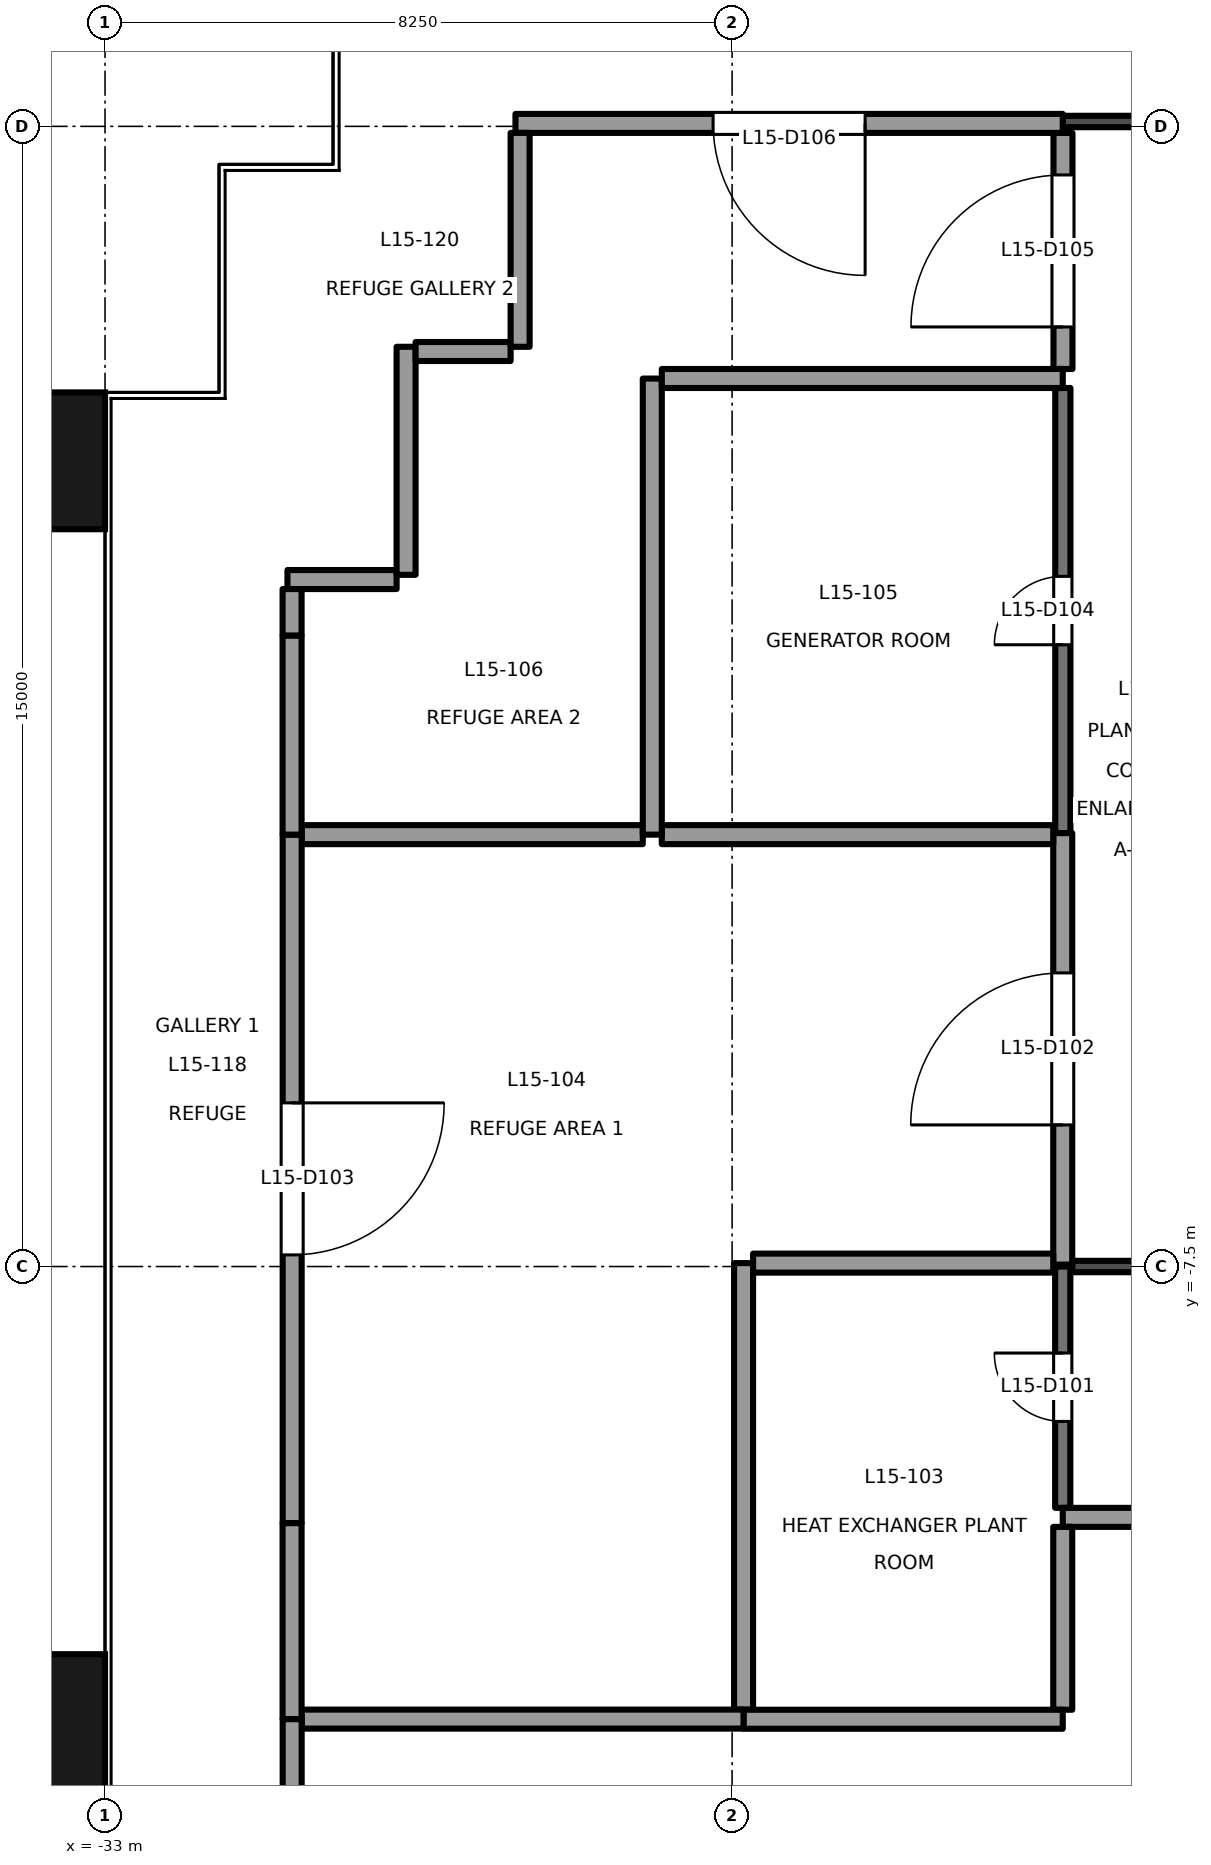
"""IFC4 building model, lengths in metres.
Left out: names, types, materials, properties, quantities, classifications, styles, units other than length and angle.
Written with IfcOpenShell. Run it as: python <this file> out.ifc"""

import sys

from ifc_helpers import new_model, si_unit, direction, frame, frame_2d, origin, origin_2d, place, context, subcontext, project, spatial, rectangle, extrude, element, fill, save


model = new_model("IFC4")
c1 = context("Model", 3, precision=1e-05, world=origin(), true_north=direction((0.0, 1.0)))
c2 = subcontext(c1, "Body", "Model", "MODEL_VIEW")
j1 = project(units=[si_unit("LENGTHUNIT", "METRE"), si_unit("PLANEANGLEUNIT", "RADIAN")], contexts=[c1])
p1 = place(None, origin())
s1 = spatial("IfcSite", under=j1, at=p1, CompositionType="ELEMENT")
p2 = place(p1, origin())
s2 = spatial("IfcBuilding", under=s1, at=p2, CompositionType="ELEMENT")
p3 = place(p2, frame((0.0, 0.0, 69.3)))
s3 = spatial("IfcBuildingStorey", under=s2, at=p3, CompositionType="ELEMENT", Elevation=69.3)
for number, where, z_axis, x_axis in (
    (1, (-33.9, -13.5, -0.2), (0.0, 0.0, 1.0), (0.0, 1.0, 0.0)),
    (2, (-33.9, 3.1, -0.2), (0.0, 0.0, 1.0), (0.0, 1.0, 0.0)),
):
    element("IfcColumn", number, at=place(p3, frame(where, z_axis=z_axis, x_axis=x_axis)), inside=s3, PredefinedType="COLUMN", context=c2, shape_type="SweptSolid", body=[
        extrude(rectangle(XDim=1.8, YDim=1.8, at=origin_2d()), origin(), (0.0, 0.0, 1.0), 5.0),
    ])
p4 = place(p3, frame((-20.275, -7.5, 0.0), z_axis=(0.0, 0.0, 1.0), x_axis=(1.0, 0.0, 0.0)))
e3 = element("IfcWall", 3, at=p4, inside=s3, PredefinedType="PARTITIONING", context=c2, shape_type="SweptSolid", body=[
    extrude(rectangle(XDim=2.295, YDim=0.15, at=frame_2d((1.147, 0.0))), origin(), (0.0, 0.0, 1.0), 2.15),
])
p5 = place(p3, frame((-20.4, -10.675, 0.0), z_axis=(0.0, 0.0, 1.0), x_axis=(0.0, 1.0, 0.0)))
e4 = element("IfcWall", 4, at=p5, inside=s3, PredefinedType="PARTITIONING", context=c2, shape_type="SweptSolid", body=[
    extrude(rectangle(XDim=3.175, YDim=0.2, at=frame_2d((1.587, 0.0))), origin(), (0.0, 0.0, 1.0), 4.4),
])
p6 = place(p5, frame((1.137, 0.0, 0.0)))
e5 = element("IfcOpeningElement", 5, at=p6, cuts=e4, PredefinedType="OPENING", context=c2, shape_type="SweptSolid", body=[
    extrude(rectangle(XDim=0.9, YDim=2.1, at=frame_2d((0.45, 1.05))), frame((0.0, 0.111, 0.0), z_axis=(0.0, -1.0, 0.0), x_axis=(1.0, 0.0, 0.0)), (0.0, 0.0, 1.0), 0.221),
])
p7 = place(p3, frame((-6.125, -10.8, 0.0), z_axis=(0.0, 0.0, 1.0), x_axis=(-1.0, 0.0, 0.0)))
e6 = element("IfcWall", 6, at=p7, inside=s3, PredefinedType="PARTITIONING", context=c2, shape_type="SweptSolid", body=[
    extrude(rectangle(XDim=14.275, YDim=0.25, at=frame_2d((7.137, 0.0))), origin(), (0.0, 0.0, 1.0), 2.15),
])
p8 = place(p7, frame((6.138, 0.0, 0.0)))
e7 = element("IfcOpeningElement", 7, at=p8, cuts=e6, PredefinedType="OPENING", context=c2, shape_type="SweptSolid", body=[
    extrude(rectangle(XDim=2.0, YDim=2.1, at=frame_2d((1.0, 1.05))), frame((0.0, 0.135, 0.0), z_axis=(0.0, -1.0, 0.0), x_axis=(1.0, 0.0, 0.0)), (0.0, 0.0, 1.0), 0.271),
])
p9 = place(p3, frame((-20.4, -7.475, 0.0), z_axis=(0.0, 0.0, 1.0), x_axis=(0.0, 1.0, 0.0)))
e8 = element("IfcWall", 8, at=p9, inside=s3, PredefinedType="PARTITIONING", context=c2, shape_type="SweptSolid", body=[
    extrude(rectangle(XDim=5.677, YDim=0.25, at=frame_2d((2.838, 0.0))), origin(), (0.0, 0.0, 1.0), 4.4),
])
p10 = place(p9, frame((1.838, 0.0, 0.0)))
e9 = element("IfcOpeningElement", 9, at=p10, cuts=e8, PredefinedType="OPENING", context=c2, shape_type="SweptSolid", body=[
    extrude(rectangle(XDim=2.0, YDim=2.1, at=frame_2d((1.0, 1.05))), frame((0.0, 0.135, 0.0), z_axis=(0.0, -1.0, 0.0), x_axis=(1.0, 0.0, 0.0)), (0.0, 0.0, 1.0), 0.271),
])
p11 = place(p3, frame((-20.399, -1.798, 0.0), z_axis=(0.0, 0.0, 1.0), x_axis=(0.0, 1.0, 0.0)))
e10 = element("IfcWall", 10, at=p11, inside=s3, PredefinedType="PARTITIONING", context=c2, shape_type="SweptSolid", body=[
    extrude(rectangle(XDim=5.856, YDim=0.2, at=frame_2d((2.928, 0.0))), origin(), (0.0, 0.0, 1.0), 2.75),
])
p12 = place(p11, frame((2.478, 0.0, 0.0)))
e11 = element("IfcOpeningElement", 11, at=p12, cuts=e10, PredefinedType="OPENING", context=c2, shape_type="SweptSolid", body=[
    extrude(rectangle(XDim=0.9, YDim=2.1, at=frame_2d((0.45, 1.05))), frame((0.0, 0.111, 0.0), z_axis=(0.0, -1.0, 0.0), x_axis=(1.0, 0.0, 0.0)), (0.0, 0.0, 1.0), 0.221),
])
p13 = place(p3, frame((-20.397, 4.308, 0.0), z_axis=(0.0, 0.0, 1.0), x_axis=(0.0, 1.0, 0.0)))
e12 = element("IfcWall", 12, at=p13, inside=s3, PredefinedType="PARTITIONING", context=c2, shape_type="SweptSolid", body=[
    extrude(rectangle(XDim=3.106, YDim=0.25, at=frame_2d((1.553, 0.0))), origin(), (0.0, 0.0, 1.0), 4.4),
])
p14 = place(p13, frame((0.553, 0.0, 0.0)))
e13 = element("IfcOpeningElement", 13, at=p14, cuts=e12, PredefinedType="OPENING", context=c2, shape_type="SweptSolid", body=[
    extrude(rectangle(XDim=2.0, YDim=2.1, at=frame_2d((1.0, 1.05))), frame((0.0, 0.135, 0.0), z_axis=(0.0, -1.0, 0.0), x_axis=(1.0, 0.0, 0.0)), (0.0, 0.0, 1.0), 0.271),
])
p15 = place(p3, frame((-20.4, 7.564, 0.0), z_axis=(0.0, 0.0, 1.0), x_axis=(1.0, 0.0, 0.0)))
e14 = element("IfcWall", 14, at=p15, inside=s3, PredefinedType="PARTITIONING", context=c2, shape_type="SweptSolid", body=[
    extrude(rectangle(XDim=2.58, YDim=0.15, at=frame_2d((1.29, 0.0))), origin(), (0.0, 0.0, 1.0), 2.75),
])
p16 = place(p3, frame((-24.599, -13.329, 0.0), z_axis=(0.0, 0.0, 1.0), x_axis=(0.0, 1.0, 0.0)))
e15 = element("IfcWall", 15, at=p16, inside=s3, PredefinedType="PARTITIONING", context=c2, shape_type="SweptSolid", body=[
    extrude(rectangle(XDim=5.874, YDim=0.25, at=frame_2d((2.937, 0.0))), origin(), (0.0, 0.0, 1.0), 2.75),
])
p17 = place(p3, frame((-24.474, -7.455, 0.0), z_axis=(0.0, 0.0, 1.0), x_axis=(1.0, 0.0, 0.0)))
e16 = element("IfcWall", 16, at=p17, inside=s3, PredefinedType="PARTITIONING", context=c2, shape_type="SweptSolid", body=[
    extrude(rectangle(XDim=3.949, YDim=0.25, at=frame_2d((1.975, 0.0))), origin(), (0.0, 0.0, 1.0), 4.8),
])
p18 = place(p3, frame((-20.4, -10.925, 0.0), z_axis=(0.0, 0.0, 1.0), x_axis=(0.0, -1.0, 0.0)))
e17 = element("IfcWall", 17, at=p18, inside=s3, PredefinedType="PARTITIONING", context=c2, shape_type="SweptSolid", body=[
    extrude(rectangle(XDim=2.406, YDim=0.25, at=frame_2d((1.203, 0.0))), origin(), (0.0, 0.0, 1.0), 2.75),
])
p19 = place(p3, frame((-20.4, -13.456, 0.0), z_axis=(0.0, 0.0, 1.0), x_axis=(-1.0, 0.0, 0.0)))
e18 = element("IfcWall", 18, at=p19, inside=s3, PredefinedType="PARTITIONING", context=c2, shape_type="SweptSolid", body=[
    extrude(rectangle(XDim=4.2, YDim=0.25, at=frame_2d((2.1, 0.0))), origin(), (0.0, 0.0, 1.0), 2.75),
])
p20 = place(p3, frame((-25.675, -1.818, 0.0), z_axis=(0.0, 0.0, 1.0), x_axis=(1.0, 0.0, 0.0)))
e19 = element("IfcWall", 19, at=p20, inside=s3, PredefinedType="PARTITIONING", context=c2, shape_type="SweptSolid", body=[
    extrude(rectangle(XDim=5.15, YDim=0.25, at=frame_2d((2.575, 0.0))), origin(), (0.0, 0.0, 1.0), 4.8),
])
p21 = place(p3, frame((-30.413, -1.818, 0.0), z_axis=(0.0, 0.0, 1.0), x_axis=(1.0, 0.0, 0.0)))
e20 = element("IfcWall", 20, at=p21, inside=s3, PredefinedType="PARTITIONING", context=c2, shape_type="SweptSolid", body=[
    extrude(rectangle(XDim=4.488, YDim=0.25, at=frame_2d((2.244, 0.0))), origin(), (0.0, 0.0, 1.0), 3.7),
])
p22 = place(p3, frame((-24.6, -13.454, 0.0), z_axis=(0.0, 0.0, 1.0), x_axis=(-1.0, 0.0, 0.0)))
e21 = element("IfcWall", 21, at=p22, inside=s3, PredefinedType="PARTITIONING", context=c2, shape_type="SweptSolid", body=[
    extrude(rectangle(XDim=5.813, YDim=0.25, at=frame_2d((2.906, 0.0))), origin(), (0.0, 0.0, 1.0), 2.75),
])
p23 = place(p3, frame((-30.539, -13.455, 0.0), z_axis=(0.0, 0.0, 1.0), x_axis=(0.0, 1.0, 0.0)))
e22 = element("IfcWall", 22, at=p23, inside=s3, PredefinedType="PARTITIONING", context=c2, shape_type="SweptSolid", body=[
    extrude(rectangle(XDim=2.58, YDim=0.25, at=frame_2d((1.29, 0.0))), origin(), (0.0, 0.0, 1.0), 2.75),
])
p24 = place(p3, frame((-30.538, -1.818, 0.0), z_axis=(0.0, 0.0, 1.0), x_axis=(0.0, -1.0, 0.0)))
e23 = element("IfcWall", 23, at=p24, inside=s3, PredefinedType="PARTITIONING", context=c2, shape_type="SweptSolid", body=[
    extrude(rectangle(XDim=9.057, YDim=0.25, at=frame_2d((4.528, 0.0))), origin(), (0.0, 0.0, 1.0), 4.8),
])
p25 = place(p24, frame((3.529, 0.0, 0.0)))
e24 = element("IfcOpeningElement", 24, at=p25, cuts=e23, PredefinedType="OPENING", context=c2, shape_type="SweptSolid", body=[
    extrude(rectangle(XDim=2.0, YDim=2.1, at=frame_2d((1.0, 1.05))), frame((0.0, 0.135, 0.0), z_axis=(0.0, -1.0, 0.0), x_axis=(1.0, 0.0, 0.0)), (0.0, 0.0, 1.0), 0.271),
])
p26 = place(p3, frame((-25.8, -1.818, 0.0), z_axis=(0.0, 0.0, 1.0), x_axis=(0.0, 1.0, 0.0)))
e25 = element("IfcWall", 25, at=p26, inside=s3, PredefinedType="PARTITIONING", context=c2, shape_type="SweptSolid", body=[
    extrude(rectangle(XDim=6.0, YDim=0.25, at=frame_2d((3.0, 0.0))), origin(), (0.0, 0.0, 1.0), 2.75),
])
p27 = place(p3, frame((-25.675, 4.183, 0.0), z_axis=(0.0, 0.0, 1.0), x_axis=(1.0, 0.0, 0.0)))
e26 = element("IfcWall", 26, at=p27, inside=s3, PredefinedType="PARTITIONING", context=c2, shape_type="SweptSolid", body=[
    extrude(rectangle(XDim=5.275, YDim=0.25, at=frame_2d((2.638, 0.0))), origin(), (0.0, 0.0, 1.0), 4.8),
])
p28 = place(p3, frame((-30.539, -1.818, 0.0), z_axis=(0.0, 0.0, 1.0), x_axis=(0.0, 1.0, 0.0)))
e27 = element("IfcWall", 27, at=p28, inside=s3, PredefinedType="PARTITIONING", context=c2, shape_type="SweptSolid", body=[
    extrude(rectangle(XDim=2.62, YDim=0.25, at=frame_2d((1.31, 0.0))), origin(), (0.0, 0.0, 1.0), 4.8),
])
p29 = place(p3, frame((-30.6, 1.538, 0.0), z_axis=(0.0, 0.0, 1.0), x_axis=(1.0, 0.0, 0.0)))
e28 = element("IfcWall", 28, at=p29, inside=s3, PredefinedType="PARTITIONING", context=c2, shape_type="SweptSolid", body=[
    extrude(rectangle(XDim=1.436, YDim=0.25, at=frame_2d((0.718, 0.0))), origin(), (0.0, 0.0, 1.0), 4.8),
])
p30 = place(p3, frame((-30.539, 0.802, 0.0), z_axis=(0.0, 0.0, 1.0), x_axis=(0.0, 1.0, 0.0)))
e29 = element("IfcWall", 29, at=p30, inside=s3, PredefinedType="PARTITIONING", context=c2, shape_type="SweptSolid", body=[
    extrude(rectangle(XDim=0.611, YDim=0.25, at=frame_2d((0.306, 0.0))), origin(), (0.0, 0.0, 1.0), 4.8),
])
p31 = place(p3, frame((-29.039, 1.6, 0.0), z_axis=(0.0, 0.0, 1.0), x_axis=(0.0, 1.0, 0.0)))
e30 = element("IfcWall", 30, at=p31, inside=s3, PredefinedType="PARTITIONING", context=c2, shape_type="SweptSolid", body=[
    extrude(rectangle(XDim=3.0, YDim=0.25, at=frame_2d((1.5, 0.0))), origin(), (0.0, 0.0, 1.0), 2.75),
])
p32 = place(p3, frame((-28.914, 4.538, 0.0), z_axis=(0.0, 0.0, 1.0), x_axis=(1.0, 0.0, 0.0)))
e31 = element("IfcWall", 31, at=p32, inside=s3, PredefinedType="PARTITIONING", context=c2, shape_type="SweptSolid", body=[
    extrude(rectangle(XDim=1.25, YDim=0.25, at=frame_2d((0.625, 0.0))), origin(), (0.0, 0.0, 1.0), 4.8),
])
p33 = place(p3, frame((-20.4, 7.539, 0.0), z_axis=(0.0, 0.0, 1.0), x_axis=(-1.0, 0.0, 0.0)))
e32 = element("IfcWall", 32, at=p33, inside=s3, PredefinedType="PARTITIONING", context=c2, shape_type="SweptSolid", body=[
    extrude(rectangle(XDim=7.2, YDim=0.25, at=frame_2d((3.6, 0.0))), origin(), (0.0, 0.0, 1.0), 4.8),
])
p34 = place(p33, frame((2.6, 0.0, 0.0)))
e33 = element("IfcOpeningElement", 33, at=p34, cuts=e32, PredefinedType="OPENING", context=c2, shape_type="SweptSolid", body=[
    extrude(rectangle(XDim=2.0, YDim=2.1, at=frame_2d((1.0, 1.05))), frame((0.0, 0.135, 0.0), z_axis=(0.0, -1.0, 0.0), x_axis=(1.0, 0.0, 0.0)), (0.0, 0.0, 1.0), 0.271),
])
p35 = place(p3, frame((-27.539, 4.6, 0.0), z_axis=(0.0, 0.0, 1.0), x_axis=(0.0, 1.0, 0.0)))
e34 = element("IfcWall", 34, at=p35, inside=s3, PredefinedType="PARTITIONING", context=c2, shape_type="SweptSolid", body=[
    extrude(rectangle(XDim=2.814, YDim=0.25, at=frame_2d((1.407, 0.0))), origin(), (0.0, 0.0, 1.0), 4.8),
])
p36 = place(p3, frame((-30.538, -25.6, 0.0), z_axis=(0.0, 0.0, 1.0), x_axis=(0.0, 1.0, 0.0)))
e35 = element("IfcWall", 35, at=p36, inside=s3, PredefinedType="PARTITIONING", context=c2, shape_type="SweptSolid", body=[
    extrude(rectangle(XDim=12.145, YDim=0.25, at=frame_2d((6.073, 0.0))), origin(), (0.0, 0.0, 1.0), 2.75),
])
p37 = place(p6, origin())
e36 = element("IfcDoor", 36, at=p37, inside=s3, OperationType="SINGLE_SWING_RIGHT", PredefinedType="DOOR", context=c2, shape_type="SweptSolid", body=[
    extrude(rectangle(XDim=0.9, YDim=2.1, at=frame_2d((0.45, 1.05))), frame((0.0, 0.025, 0.0), z_axis=(0.0, -1.0, 0.0), x_axis=(1.0, 0.0, 0.0)), (0.0, 0.0, 1.0), 0.05),
])
fill(e5, e36)
p38 = place(p10, origin())
e37 = element("IfcDoor", 37, at=p38, inside=s3, OperationType="DOUBLE_DOOR_SINGLE_SWING", PredefinedType="DOOR", context=c2, shape_type="SweptSolid", body=[
    extrude(rectangle(XDim=2.0, YDim=2.1, at=frame_2d((1.0, 1.05))), frame((0.0, 0.025, 0.0), z_axis=(0.0, -1.0, 0.0), x_axis=(1.0, 0.0, 0.0)), (0.0, 0.0, 1.0), 0.05),
])
fill(e9, e37)
p39 = place(p25, origin())
e38 = element("IfcDoor", 38, at=p39, inside=s3, OperationType="DOUBLE_DOOR_SINGLE_SWING", PredefinedType="DOOR", context=c2, shape_type="SweptSolid", body=[
    extrude(rectangle(XDim=2.0, YDim=2.1, at=frame_2d((1.0, 1.05))), frame((0.0, 0.025, 0.0), z_axis=(0.0, -1.0, 0.0), x_axis=(1.0, 0.0, 0.0)), (0.0, 0.0, 1.0), 0.05),
])
fill(e24, e38)
p40 = place(p12, origin())
e39 = element("IfcDoor", 39, at=p40, inside=s3, OperationType="SINGLE_SWING_LEFT", PredefinedType="DOOR", context=c2, shape_type="SweptSolid", body=[
    extrude(rectangle(XDim=0.9, YDim=2.1, at=frame_2d((0.45, 1.05))), frame((0.0, 0.025, 0.0), z_axis=(0.0, -1.0, 0.0), x_axis=(1.0, 0.0, 0.0)), (0.0, 0.0, 1.0), 0.05),
])
fill(e11, e39)
p41 = place(p14, origin())
e40 = element("IfcDoor", 40, at=p41, inside=s3, OperationType="DOUBLE_DOOR_SINGLE_SWING", PredefinedType="DOOR", context=c2, shape_type="SweptSolid", body=[
    extrude(rectangle(XDim=2.0, YDim=2.1, at=frame_2d((1.0, 1.05))), frame((0.0, 0.025, 0.0), z_axis=(0.0, -1.0, 0.0), x_axis=(1.0, 0.0, 0.0)), (0.0, 0.0, 1.0), 0.05),
])
fill(e13, e40)
p42 = place(p34, origin())
e41 = element("IfcDoor", 41, at=p42, inside=s3, OperationType="DOUBLE_DOOR_SINGLE_SWING", PredefinedType="DOOR", context=c2, shape_type="SweptSolid", body=[
    extrude(rectangle(XDim=2.0, YDim=2.1, at=frame_2d((1.0, 1.05))), frame((0.0, 0.025, 0.0), z_axis=(0.0, -1.0, 0.0), x_axis=(1.0, 0.0, 0.0)), (0.0, 0.0, 1.0), 0.05),
])
fill(e33, e41)
save(model, sys.argv[1])
